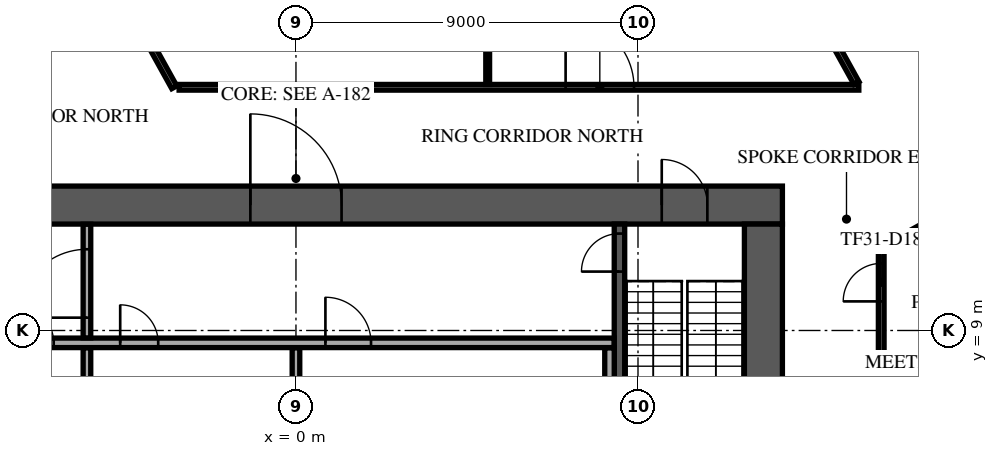
"""IFC4 building model, lengths in metres.
Left out: names, types, materials, properties, quantities, classifications, styles, units other than length and angle.
Written with IfcOpenShell. Run it as: python <this file> out.ifc"""

import sys

from ifc_helpers import new_model, si_unit, direction, frame, frame_2d, origin, place, context, subcontext, project, spatial, rectangle, extrude, element, fill, save


model = new_model("IFC4")
c1 = context("Model", 3, precision=1e-05, world=origin(), true_north=direction((0.0, 1.0)))
c2 = subcontext(c1, "Body", "Model", "MODEL_VIEW")
j1 = project(units=[si_unit("LENGTHUNIT", "METRE"), si_unit("PLANEANGLEUNIT", "RADIAN")], contexts=[c1])
p1 = place(None, origin())
s1 = spatial("IfcSite", under=j1, at=p1, CompositionType="ELEMENT")
p2 = place(p1, origin())
s2 = spatial("IfcBuilding", under=s1, at=p2, CompositionType="ELEMENT")
p3 = place(p2, frame((0.0, 0.0, 139.7)))
s3 = spatial("IfcBuildingStorey", under=s2, at=p3, CompositionType="ELEMENT", Elevation=139.7)
p4 = place(p3, frame((-12.8, 12.3, 0.0), z_axis=(0.0, 0.0, 1.0), x_axis=(1.0, 0.0, 0.0)))
e1 = element("IfcWall", 1, at=p4, inside=s3, PredefinedType="SHEAR", context=c2, shape_type="SweptSolid", body=[
    extrude(rectangle(XDim=25.6, YDim=1.0, at=frame_2d((12.8, 0.0))), origin(), (0.0, 0.0, 1.0), 3.6),
])
p5 = place(p4, frame((11.6, 0.0, 0.0)))
e2 = element("IfcOpeningElement", 2, at=p5, cuts=e1, PredefinedType="OPENING", context=c2, shape_type="SweptSolid", body=[
    extrude(rectangle(XDim=2.4, YDim=2.4, at=frame_2d((1.2, 1.2))), frame((0.0, 0.51, 0.0), z_axis=(0.0, -1.0, 0.0), x_axis=(1.0, 0.0, 0.0)), (0.0, 0.0, 1.0), 1.02),
])
p6 = place(p4, frame((22.425, 0.0, 0.0)))
e3 = element("IfcOpeningElement", 3, at=p6, cuts=e1, PredefinedType="OPENING", context=c2, shape_type="SweptSolid", body=[
    extrude(rectangle(XDim=1.2, YDim=2.1, at=frame_2d((0.6, 1.05))), frame((0.0, 0.51, 0.0), z_axis=(0.0, -1.0, 0.0), x_axis=(1.0, 0.0, 0.0)), (0.0, 0.0, 1.0), 1.02),
])
p7 = place(p4, frame((1.4, 0.0, 0.0)))
e4 = element("IfcOpeningElement", 4, at=p7, cuts=e1, PredefinedType="OPENING", context=c2, shape_type="SweptSolid", body=[
    extrude(rectangle(XDim=1.0, YDim=2.1, at=frame_2d((0.5, 1.05))), frame((0.0, 0.51, 0.0), z_axis=(0.0, -1.0, 0.0), x_axis=(1.0, 0.0, 0.0)), (0.0, 0.0, 1.0), 1.02),
])
p8 = place(p3, frame((12.3, -11.8, 0.0), z_axis=(0.0, 0.0, 1.0), x_axis=(0.0, 1.0, 0.0)))
e5 = element("IfcWall", 5, at=p8, inside=s3, PredefinedType="SHEAR", context=c2, shape_type="SweptSolid", body=[
    extrude(rectangle(XDim=23.6, YDim=1.0, at=frame_2d((11.8, 0.0))), origin(), (0.0, 0.0, 1.0), 3.6),
])
p9 = place(p8, frame((10.6, 0.0, 0.0)))
e6 = element("IfcOpeningElement", 6, at=p9, cuts=e5, PredefinedType="OPENING", context=c2, shape_type="SweptSolid", body=[
    extrude(rectangle(XDim=2.4, YDim=2.4, at=frame_2d((1.2, 1.2))), frame((0.0, 0.51, 0.0), z_axis=(0.0, -1.0, 0.0), x_axis=(1.0, 0.0, 0.0)), (0.0, 0.0, 1.0), 1.02),
])
p10 = place(p3, frame((8.512, 4.55, 0.0), z_axis=(0.0, 0.0, 1.0), x_axis=(0.0, 1.0, 0.0)))
e7 = element("IfcWall", 7, at=p10, inside=s3, PredefinedType="SOLIDWALL", context=c2, shape_type="SweptSolid", body=[
    extrude(rectangle(XDim=7.25, YDim=0.275, at=frame_2d((3.625, 0.0))), origin(), (0.0, 0.0, 1.0), 3.6),
])
p11 = place(p10, frame((6.0, 0.0, 0.0)))
e8 = element("IfcOpeningElement", 8, at=p11, cuts=e7, PredefinedType="OPENING", context=c2, shape_type="SweptSolid", body=[
    extrude(rectangle(XDim=1.0, YDim=2.1, at=frame_2d((0.5, 1.05))), frame((0.0, 0.147, 0.0), z_axis=(0.0, -1.0, 0.0), x_axis=(1.0, 0.0, 0.0)), (0.0, 0.0, 1.0), 0.295),
])
for number, where, z_axis, x_axis in (
    (9, (-5.5, 5.855, 0.0), (0.0, 0.0, 1.0), (0.0, 1.0, 0.0)),
    (10, (0.0, 5.855, 0.0), (0.0, 0.0, 1.0), (0.0, 1.0, 0.0)),
):
    element("IfcWall", number, at=place(p3, frame(where, z_axis=z_axis, x_axis=x_axis)), inside=s3, PredefinedType="PARTITIONING", context=c2, shape_type="SweptSolid", body=[
        extrude(rectangle(XDim=2.69, YDim=0.2, at=frame_2d((1.345, 0.0))), origin(), (0.0, 0.0, 1.0), 3.6),
    ])
p12 = place(p3, frame((8.25, 5.855, 0.0), z_axis=(0.0, 0.0, 1.0), x_axis=(0.0, 1.0, 0.0)))
e11 = element("IfcWall", 11, at=p12, inside=s3, PredefinedType="PARTITIONING", context=c2, shape_type="SweptSolid", body=[
    extrude(rectangle(XDim=2.69, YDim=0.25, at=frame_2d((1.345, 0.0))), origin(), (0.0, 0.0, 1.0), 3.6),
])
p13 = place(p3, frame((-8.35, 8.675, 0.0), z_axis=(0.0, 0.0, 1.0), x_axis=(1.0, 0.0, 0.0)))
e12 = element("IfcWall", 12, at=p13, inside=s3, PredefinedType="PARTITIONING", context=c2, shape_type="SweptSolid", body=[
    extrude(rectangle(XDim=16.72, YDim=0.25, at=frame_2d((8.36, 0.0))), origin(), (0.0, 0.0, 1.0), 3.6),
])
p14 = place(p13, frame((0.975, 0.0, 0.0)))
e13 = element("IfcOpeningElement", 13, at=p14, cuts=e12, PredefinedType="OPENING", context=c2, shape_type="SweptSolid", body=[
    extrude(rectangle(XDim=1.0, YDim=2.1, at=frame_2d((0.5, 1.05))), frame((0.0, 0.135, 0.0), z_axis=(0.0, -1.0, 0.0), x_axis=(1.0, 0.0, 0.0)), (0.0, 0.0, 1.0), 0.27),
])
p15 = place(p13, frame((3.725, 0.0, 0.0)))
e14 = element("IfcOpeningElement", 14, at=p15, cuts=e12, PredefinedType="OPENING", context=c2, shape_type="SweptSolid", body=[
    extrude(rectangle(XDim=1.0, YDim=2.1, at=frame_2d((0.5, 1.05))), frame((0.0, 0.135, 0.0), z_axis=(0.0, -1.0, 0.0), x_axis=(1.0, 0.0, 0.0)), (0.0, 0.0, 1.0), 0.27),
])
p16 = place(p13, frame((9.125, 0.0, 0.0)))
e15 = element("IfcOpeningElement", 15, at=p16, cuts=e12, PredefinedType="OPENING", context=c2, shape_type="SweptSolid", body=[
    extrude(rectangle(XDim=1.2, YDim=2.1, at=frame_2d((0.6, 1.05))), frame((0.0, 0.135, 0.0), z_axis=(0.0, -1.0, 0.0), x_axis=(1.0, 0.0, 0.0)), (0.0, 0.0, 1.0), 0.27),
])
p17 = place(p3, frame((-5.5, 8.805, 0.0), z_axis=(0.0, 0.0, 1.0), x_axis=(0.0, 1.0, 0.0)))
e16 = element("IfcWall", 16, at=p17, inside=s3, PredefinedType="PARTITIONING", context=c2, shape_type="SweptSolid", body=[
    extrude(rectangle(XDim=2.99, YDim=0.2, at=frame_2d((1.495, 0.0))), origin(), (0.0, 0.0, 1.0), 3.6),
])
p18 = place(p17, frame((0.532, 0.0, 0.0)))
e17 = element("IfcOpeningElement", 17, at=p18, cuts=e16, PredefinedType="OPENING", context=c2, shape_type="SweptSolid", body=[
    extrude(rectangle(XDim=1.8, YDim=2.1, at=frame_2d((0.9, 1.05))), frame((0.0, 0.11, 0.0), z_axis=(0.0, -1.0, 0.0), x_axis=(1.0, 0.0, 0.0)), (0.0, 0.0, 1.0), 0.22),
])
p19 = place(p3, frame((8.775, 34.705, 0.0), z_axis=(0.0, 0.0, 1.0), x_axis=(-0.874620778241, -0.484807687922, 0.0)))
e18 = element("IfcWall", 18, at=p19, inside=s3, PredefinedType="STANDARD", context=c2, shape_type="SweptSolid", body=[
    extrude(rectangle(XDim=49.376, YDim=0.6, at=frame_2d((24.688, 0.0))), origin(), (0.0, 0.0, 1.0), 3.6),
])
p20 = place(p19, frame((1.2, 0.0, 0.9)))
e19 = element("IfcOpeningElement", 19, at=p20, cuts=e18, PredefinedType="OPENING", context=c2, shape_type="SweptSolid", body=[
    extrude(rectangle(XDim=2.1, YDim=2.1, at=frame_2d((1.05, 1.05))), frame((0.0, 0.31, 0.0), z_axis=(0.0, -1.0, 0.0), x_axis=(1.0, 0.0, 0.0)), (0.0, 0.0, 1.0), 0.62),
])
p21 = place(p19, frame((5.7, 0.0, 0.9)))
e20 = element("IfcOpeningElement", 20, at=p21, cuts=e18, PredefinedType="OPENING", context=c2, shape_type="SweptSolid", body=[
    extrude(rectangle(XDim=2.1, YDim=2.1, at=frame_2d((1.05, 1.05))), frame((0.0, 0.31, 0.0), z_axis=(0.0, -1.0, 0.0), x_axis=(1.0, 0.0, 0.0)), (0.0, 0.0, 1.0), 0.62),
])
p22 = place(p19, frame((14.7, 0.0, 0.9)))
e21 = element("IfcOpeningElement", 21, at=p22, cuts=e18, PredefinedType="OPENING", context=c2, shape_type="SweptSolid", body=[
    extrude(rectangle(XDim=2.1, YDim=2.1, at=frame_2d((1.05, 1.05))), frame((0.0, 0.31, 0.0), z_axis=(0.0, -1.0, 0.0), x_axis=(1.0, 0.0, 0.0)), (0.0, 0.0, 1.0), 0.62),
])
p23 = place(p19, frame((19.2, 0.0, 0.9)))
e22 = element("IfcOpeningElement", 22, at=p23, cuts=e18, PredefinedType="OPENING", context=c2, shape_type="SweptSolid", body=[
    extrude(rectangle(XDim=2.1, YDim=2.1, at=frame_2d((1.05, 1.05))), frame((0.0, 0.31, 0.0), z_axis=(0.0, -1.0, 0.0), x_axis=(1.0, 0.0, 0.0)), (0.0, 0.0, 1.0), 0.62),
])
p24 = place(p19, frame((23.7, 0.0, 0.9)))
e23 = element("IfcOpeningElement", 23, at=p24, cuts=e18, PredefinedType="OPENING", context=c2, shape_type="SweptSolid", body=[
    extrude(rectangle(XDim=2.1, YDim=2.1, at=frame_2d((1.05, 1.05))), frame((0.0, 0.31, 0.0), z_axis=(0.0, -1.0, 0.0), x_axis=(1.0, 0.0, 0.0)), (0.0, 0.0, 1.0), 0.62),
])
p25 = place(p19, frame((28.2, 0.0, 0.9)))
e24 = element("IfcOpeningElement", 24, at=p25, cuts=e18, PredefinedType="OPENING", context=c2, shape_type="SweptSolid", body=[
    extrude(rectangle(XDim=2.1, YDim=2.1, at=frame_2d((1.05, 1.05))), frame((0.0, 0.31, 0.0), z_axis=(0.0, -1.0, 0.0), x_axis=(1.0, 0.0, 0.0)), (0.0, 0.0, 1.0), 0.62),
])
p26 = place(p19, frame((32.7, 0.0, 0.9)))
e25 = element("IfcOpeningElement", 25, at=p26, cuts=e18, PredefinedType="OPENING", context=c2, shape_type="SweptSolid", body=[
    extrude(rectangle(XDim=2.1, YDim=2.1, at=frame_2d((1.05, 1.05))), frame((0.0, 0.31, 0.0), z_axis=(0.0, -1.0, 0.0), x_axis=(1.0, 0.0, 0.0)), (0.0, 0.0, 1.0), 0.62),
])
p27 = place(p19, frame((37.2, 0.0, 0.9)))
e26 = element("IfcOpeningElement", 26, at=p27, cuts=e18, PredefinedType="OPENING", context=c2, shape_type="SweptSolid", body=[
    extrude(rectangle(XDim=2.1, YDim=2.1, at=frame_2d((1.05, 1.05))), frame((0.0, 0.31, 0.0), z_axis=(0.0, -1.0, 0.0), x_axis=(1.0, 0.0, 0.0)), (0.0, 0.0, 1.0), 0.62),
])
p28 = place(p19, frame((41.7, 0.0, 0.9)))
e27 = element("IfcOpeningElement", 27, at=p28, cuts=e18, PredefinedType="OPENING", context=c2, shape_type="SweptSolid", body=[
    extrude(rectangle(XDim=2.1, YDim=2.1, at=frame_2d((1.05, 1.05))), frame((0.0, 0.31, 0.0), z_axis=(0.0, -1.0, 0.0), x_axis=(1.0, 0.0, 0.0)), (0.0, 0.0, 1.0), 0.62),
])
p29 = place(p19, frame((46.138, 0.0, 0.9)))
e28 = element("IfcOpeningElement", 28, at=p29, cuts=e18, PredefinedType="OPENING", context=c2, shape_type="SweptSolid", body=[
    extrude(rectangle(XDim=2.1, YDim=2.1, at=frame_2d((1.05, 1.05))), frame((0.0, 0.31, 0.0), z_axis=(0.0, -1.0, 0.0), x_axis=(1.0, 0.0, 0.0)), (0.0, 0.0, 1.0), 0.62),
])
p30 = place(p3, frame((36.291, -4.209, 0.0), z_axis=(0.0, 0.0, 1.0), x_axis=(-0.484811111615, 0.874618880458, 0.0)))
e29 = element("IfcWall", 29, at=p30, inside=s3, PredefinedType="STANDARD", context=c2, shape_type="SweptSolid", body=[
    extrude(rectangle(XDim=42.176, YDim=0.6, at=frame_2d((21.088, 0.0))), origin(), (0.0, 0.0, 1.0), 3.6),
])
p31 = place(p30, frame((1.138, 0.0, 0.9)))
e30 = element("IfcOpeningElement", 30, at=p31, cuts=e29, PredefinedType="OPENING", context=c2, shape_type="SweptSolid", body=[
    extrude(rectangle(XDim=2.3, YDim=2.1, at=frame_2d((1.15, 1.05))), frame((0.0, 0.31, 0.0), z_axis=(0.0, -1.0, 0.0), x_axis=(1.0, 0.0, 0.0)), (0.0, 0.0, 1.0), 0.62),
])
p32 = place(p30, frame((5.776, 0.0, 0.9)))
e31 = element("IfcOpeningElement", 31, at=p32, cuts=e29, PredefinedType="OPENING", context=c2, shape_type="SweptSolid", body=[
    extrude(rectangle(XDim=2.3, YDim=2.1, at=frame_2d((1.15, 1.05))), frame((0.0, 0.31, 0.0), z_axis=(0.0, -1.0, 0.0), x_axis=(1.0, 0.0, 0.0)), (0.0, 0.0, 1.0), 0.62),
])
p33 = place(p30, frame((15.176, 0.0, 0.9)))
e32 = element("IfcOpeningElement", 32, at=p33, cuts=e29, PredefinedType="OPENING", context=c2, shape_type="SweptSolid", body=[
    extrude(rectangle(XDim=2.3, YDim=2.1, at=frame_2d((1.15, 1.05))), frame((0.0, 0.31, 0.0), z_axis=(0.0, -1.0, 0.0), x_axis=(1.0, 0.0, 0.0)), (0.0, 0.0, 1.0), 0.62),
])
p34 = place(p30, frame((19.876, 0.0, 0.9)))
e33 = element("IfcOpeningElement", 33, at=p34, cuts=e29, PredefinedType="OPENING", context=c2, shape_type="SweptSolid", body=[
    extrude(rectangle(XDim=2.3, YDim=2.1, at=frame_2d((1.15, 1.05))), frame((0.0, 0.31, 0.0), z_axis=(0.0, -1.0, 0.0), x_axis=(1.0, 0.0, 0.0)), (0.0, 0.0, 1.0), 0.62),
])
p35 = place(p30, frame((24.576, 0.0, 0.9)))
e34 = element("IfcOpeningElement", 34, at=p35, cuts=e29, PredefinedType="OPENING", context=c2, shape_type="SweptSolid", body=[
    extrude(rectangle(XDim=2.3, YDim=2.1, at=frame_2d((1.15, 1.05))), frame((0.0, 0.31, 0.0), z_axis=(0.0, -1.0, 0.0), x_axis=(1.0, 0.0, 0.0)), (0.0, 0.0, 1.0), 0.62),
])
p36 = place(p30, frame((29.276, 0.0, 0.9)))
e35 = element("IfcOpeningElement", 35, at=p36, cuts=e29, PredefinedType="OPENING", context=c2, shape_type="SweptSolid", body=[
    extrude(rectangle(XDim=2.3, YDim=2.1, at=frame_2d((1.15, 1.05))), frame((0.0, 0.31, 0.0), z_axis=(0.0, -1.0, 0.0), x_axis=(1.0, 0.0, 0.0)), (0.0, 0.0, 1.0), 0.62),
])
p37 = place(p30, frame((33.976, 0.0, 0.9)))
e36 = element("IfcOpeningElement", 36, at=p37, cuts=e29, PredefinedType="OPENING", context=c2, shape_type="SweptSolid", body=[
    extrude(rectangle(XDim=2.3, YDim=2.1, at=frame_2d((1.15, 1.05))), frame((0.0, 0.31, 0.0), z_axis=(0.0, -1.0, 0.0), x_axis=(1.0, 0.0, 0.0)), (0.0, 0.0, 1.0), 0.62),
])
p38 = place(p30, frame((38.676, 0.0, 0.9)))
e37 = element("IfcOpeningElement", 37, at=p38, cuts=e29, PredefinedType="OPENING", context=c2, shape_type="SweptSolid", body=[
    extrude(rectangle(XDim=2.3, YDim=2.1, at=frame_2d((1.15, 1.05))), frame((0.0, 0.31, 0.0), z_axis=(0.0, -1.0, 0.0), x_axis=(1.0, 0.0, 0.0)), (0.0, 0.0, 1.0), 0.62),
])
p39 = place(p3, frame((-23.187, 9.123, 0.0), z_axis=(0.0, 0.0, 1.0), x_axis=(0.874618419846, 0.484811942578, 0.0)))
e38 = element("IfcWall", 38, at=p39, inside=s3, PredefinedType="PARTITIONING", context=c2, shape_type="SweptSolid", body=[
    extrude(rectangle(XDim=31.713, YDim=0.15, at=frame_2d((15.857, 0.0))), origin(), (0.0, 0.0, 1.0), 3.15),
])
p40 = place(p39, frame((11.252, 0.0, 0.0)))
e39 = element("IfcOpeningElement", 39, at=p40, cuts=e38, PredefinedType="OPENING", context=c2, shape_type="SweptSolid", body=[
    extrude(rectangle(XDim=1.0, YDim=2.1, at=frame_2d((0.5, 1.05))), frame((0.0, 0.085, 0.0), z_axis=(0.0, -1.0, 0.0), x_axis=(1.0, 0.0, 0.0)), (0.0, 0.0, 1.0), 0.17),
])
p41 = place(p39, frame((19.896, 0.0, 0.0)))
e40 = element("IfcOpeningElement", 40, at=p41, cuts=e38, PredefinedType="OPENING", context=c2, shape_type="SweptSolid", body=[
    extrude(rectangle(XDim=1.0, YDim=2.1, at=frame_2d((0.5, 1.05))), frame((0.0, 0.085, 0.0), z_axis=(0.0, -1.0, 0.0), x_axis=(1.0, 0.0, 0.0)), (0.0, 0.0, 1.0), 0.17),
])
p42 = place(p39, frame((29.223, 0.0, 0.0)))
e41 = element("IfcOpeningElement", 41, at=p42, cuts=e38, PredefinedType="OPENING", context=c2, shape_type="SweptSolid", body=[
    extrude(rectangle(XDim=1.0, YDim=2.1, at=frame_2d((0.5, 1.05))), frame((0.0, 0.085, 0.0), z_axis=(0.0, -1.0, 0.0), x_axis=(1.0, 0.0, 0.0)), (0.0, 0.0, 1.0), 0.17),
])
p43 = place(p3, frame((-4.074, 16.973, 0.0), z_axis=(0.0, 0.0, 1.0), x_axis=(0.484870548803, -0.874585931114, 0.0)))
e42 = element("IfcWall", 42, at=p43, inside=s3, PredefinedType="PARTITIONING", context=c2, shape_type="SweptSolid", body=[
    extrude(rectangle(XDim=1.799, YDim=0.15, at=frame_2d((0.899, 0.0))), origin(), (0.0, 0.0, 1.0), 3.6),
])
p44 = place(p3, frame((-3.075, 15.4, 0.0), z_axis=(0.0, 0.0, 1.0), x_axis=(1.0, 0.0, 0.0)))
e43 = element("IfcWall", 43, at=p44, inside=s3, PredefinedType="PARTITIONING", context=c2, shape_type="SweptSolid", body=[
    extrude(rectangle(XDim=17.886, YDim=0.15, at=frame_2d((8.943, 0.0))), origin(), (0.0, 0.0, 1.0), 3.15),
])
p45 = place(p44, frame((10.17, 0.0, 0.0)))
e44 = element("IfcOpeningElement", 44, at=p45, cuts=e43, PredefinedType="OPENING", context=c2, shape_type="SweptSolid", body=[
    extrude(rectangle(XDim=1.8, YDim=2.1, at=frame_2d((0.9, 1.05))), frame((0.0, 0.085, 0.0), z_axis=(0.0, -1.0, 0.0), x_axis=(1.0, 0.0, 0.0)), (0.0, 0.0, 1.0), 0.17),
])
p46 = place(p3, frame((12.54, 19.497, 0.0), z_axis=(0.0, 0.0, 1.0), x_axis=(0.48474201542, -0.874657177691, 0.0)))
e45 = element("IfcWall", 45, at=p46, inside=s3, PredefinedType="PARTITIONING", context=c2, shape_type="SweptSolid", body=[
    extrude(rectangle(XDim=4.557, YDim=0.15, at=frame_2d((2.279, 0.0))), origin(), (0.0, 0.0, 1.0), 3.15),
])
p47 = place(p3, frame((14.639, 20.66, 0.0), z_axis=(0.0, 0.0, 1.0), x_axis=(0.484803020703, -0.874623365294, 0.0)))
e46 = element("IfcWall", 46, at=p47, inside=s3, PredefinedType="PARTITIONING", context=c2, shape_type="SweptSolid", body=[
    extrude(rectangle(XDim=22.02, YDim=0.15, at=frame_2d((11.01, 0.0))), origin(), (0.0, 0.0, 1.0), 3.15),
])
p48 = place(p47, frame((10.083, 0.0, 0.0)))
e47 = element("IfcOpeningElement", 47, at=p48, cuts=e46, PredefinedType="OPENING", context=c2, shape_type="SweptSolid", body=[
    extrude(rectangle(XDim=1.0, YDim=2.1, at=frame_2d((0.5, 1.05))), frame((0.0, 0.085, 0.0), z_axis=(0.0, -1.0, 0.0), x_axis=(1.0, 0.0, 0.0)), (0.0, 0.0, 1.0), 0.17),
])
p49 = place(p3, frame((15.4, -10.568, 0.0), z_axis=(0.0, 0.0, 1.0), x_axis=(0.0, 1.0, 0.0)))
e48 = element("IfcWall", 48, at=p49, inside=s3, PredefinedType="PARTITIONING", context=c2, shape_type="SweptSolid", body=[
    extrude(rectangle(XDim=21.695, YDim=0.15, at=frame_2d((10.847, 0.0))), origin(), (0.0, 0.0, 1.0), 3.15),
])
p50 = place(p49, frame((20.333, 0.0, 0.0)))
e49 = element("IfcOpeningElement", 49, at=p50, cuts=e48, PredefinedType="OPENING", context=c2, shape_type="SweptSolid", body=[
    extrude(rectangle(XDim=1.0, YDim=2.1, at=frame_2d((0.5, 1.05))), frame((0.0, 0.085, 0.0), z_axis=(0.0, -1.0, 0.0), x_axis=(1.0, 0.0, 0.0)), (0.0, 0.0, 1.0), 0.17),
])
p51 = place(p49, frame((7.55, 0.0, 0.0)))
e50 = element("IfcOpeningElement", 50, at=p51, cuts=e48, PredefinedType="OPENING", context=c2, shape_type="SweptSolid", body=[
    extrude(rectangle(XDim=1.0, YDim=2.1, at=frame_2d((0.5, 1.05))), frame((0.0, 0.085, 0.0), z_axis=(0.0, -1.0, 0.0), x_axis=(1.0, 0.0, 0.0)), (0.0, 0.0, 1.0), 0.17),
])
p52 = place(p3, frame((15.511, 11.189, 0.0), z_axis=(0.0, 0.0, 1.0), x_axis=(0.874559677803, 0.484917900227, 0.0)))
e51 = element("IfcWall", 51, at=p52, inside=s3, PredefinedType="PARTITIONING", context=c2, shape_type="SweptSolid", body=[
    extrude(rectangle(XDim=1.43, YDim=0.15, at=frame_2d((0.715, 0.0))), origin(), (0.0, 0.0, 1.0), 3.6),
])
p53 = place(p3, frame((5.045, 15.475, 0.0), z_axis=(0.0, 0.0, 1.0), x_axis=(0.0, 1.0, 0.0)))
e52 = element("IfcWall", 52, at=p53, inside=s3, PredefinedType="PARTITIONING", context=c2, shape_type="SweptSolid", body=[
    extrude(rectangle(XDim=6.439, YDim=0.1, at=frame_2d((3.22, 0.0))), origin(), (0.0, 0.0, 1.0), 3.6),
])
p54 = place(p5, origin())
e53 = element("IfcDoor", 53, at=p54, inside=s3, OperationType="SINGLE_SWING_LEFT", PredefinedType="DOOR", context=c2, shape_type="SweptSolid", body=[
    extrude(rectangle(XDim=2.4, YDim=2.4, at=frame_2d((1.2, 1.2))), frame((0.0, 0.025, 0.0), z_axis=(0.0, -1.0, 0.0), x_axis=(1.0, 0.0, 0.0)), (0.0, 0.0, 1.0), 0.05),
])
fill(e2, e53)
p55 = place(p6, origin())
e54 = element("IfcDoor", 54, at=p55, inside=s3, OperationType="SINGLE_SWING_LEFT", PredefinedType="DOOR", context=c2, shape_type="SweptSolid", body=[
    extrude(rectangle(XDim=1.2, YDim=2.1, at=frame_2d((0.6, 1.05))), frame((0.0, 0.025, 0.0), z_axis=(0.0, -1.0, 0.0), x_axis=(1.0, 0.0, 0.0)), (0.0, 0.0, 1.0), 0.05),
])
fill(e3, e54)
p56 = place(p11, origin())
e55 = element("IfcDoor", 55, at=p56, inside=s3, OperationType="SINGLE_SWING_LEFT", PredefinedType="DOOR", context=c2, shape_type="SweptSolid", body=[
    extrude(rectangle(XDim=1.0, YDim=2.1, at=frame_2d((0.5, 1.05))), frame((0.0, 0.025, 0.0), z_axis=(0.0, -1.0, 0.0), x_axis=(1.0, 0.0, 0.0)), (0.0, 0.0, 1.0), 0.05),
])
fill(e8, e55)
p57 = place(p14, origin())
e56 = element("IfcDoor", 56, at=p57, inside=s3, OperationType="SINGLE_SWING_LEFT", PredefinedType="DOOR", context=c2, shape_type="SweptSolid", body=[
    extrude(rectangle(XDim=1.0, YDim=2.1, at=frame_2d((0.5, 1.05))), frame((0.0, 0.025, 0.0), z_axis=(0.0, -1.0, 0.0), x_axis=(1.0, 0.0, 0.0)), (0.0, 0.0, 1.0), 0.05),
])
fill(e13, e56)
p58 = place(p15, origin())
e57 = element("IfcDoor", 57, at=p58, inside=s3, OperationType="SINGLE_SWING_LEFT", PredefinedType="DOOR", context=c2, shape_type="SweptSolid", body=[
    extrude(rectangle(XDim=1.0, YDim=2.1, at=frame_2d((0.5, 1.05))), frame((0.0, 0.025, 0.0), z_axis=(0.0, -1.0, 0.0), x_axis=(1.0, 0.0, 0.0)), (0.0, 0.0, 1.0), 0.05),
])
fill(e14, e57)
p59 = place(p16, origin())
e58 = element("IfcDoor", 58, at=p59, inside=s3, OperationType="SINGLE_SWING_LEFT", PredefinedType="DOOR", context=c2, shape_type="SweptSolid", body=[
    extrude(rectangle(XDim=1.2, YDim=2.1, at=frame_2d((0.6, 1.05))), frame((0.0, 0.025, 0.0), z_axis=(0.0, -1.0, 0.0), x_axis=(1.0, 0.0, 0.0)), (0.0, 0.0, 1.0), 0.05),
])
fill(e15, e58)
p60 = place(p18, origin())
e59 = element("IfcDoor", 59, at=p60, inside=s3, OperationType="SINGLE_SWING_LEFT", PredefinedType="DOOR", context=c2, shape_type="SweptSolid", body=[
    extrude(rectangle(XDim=1.8, YDim=2.1, at=frame_2d((0.9, 1.05))), frame((0.0, 0.025, 0.0), z_axis=(0.0, -1.0, 0.0), x_axis=(1.0, 0.0, 0.0)), (0.0, 0.0, 1.0), 0.05),
])
fill(e17, e59)
p61 = place(p45, origin())
e60 = element("IfcDoor", 60, at=p61, inside=s3, OperationType="DOUBLE_DOOR_SINGLE_SWING", PredefinedType="DOOR", context=c2, shape_type="SweptSolid", body=[
    extrude(rectangle(XDim=1.8, YDim=2.1, at=frame_2d((0.9, 1.05))), frame((0.0, 0.025, 0.0), z_axis=(0.0, -1.0, 0.0), x_axis=(1.0, 0.0, 0.0)), (0.0, 0.0, 1.0), 0.05),
])
fill(e44, e60)
p62 = place(p50, frame((1.0, 0.0, 0.0), z_axis=(0.0, 0.0, 1.0), x_axis=(-1.0, 0.0, 0.0)))
e61 = element("IfcDoor", 61, at=p62, inside=s3, OperationType="SINGLE_SWING_LEFT", PredefinedType="DOOR", context=c2, shape_type="SweptSolid", body=[
    extrude(rectangle(XDim=1.0, YDim=2.1, at=frame_2d((0.5, 1.05))), frame((0.0, 0.025, 0.0), z_axis=(0.0, -1.0, 0.0), x_axis=(1.0, 0.0, 0.0)), (0.0, 0.0, 1.0), 0.05),
])
fill(e49, e61)
save(model, sys.argv[1])
